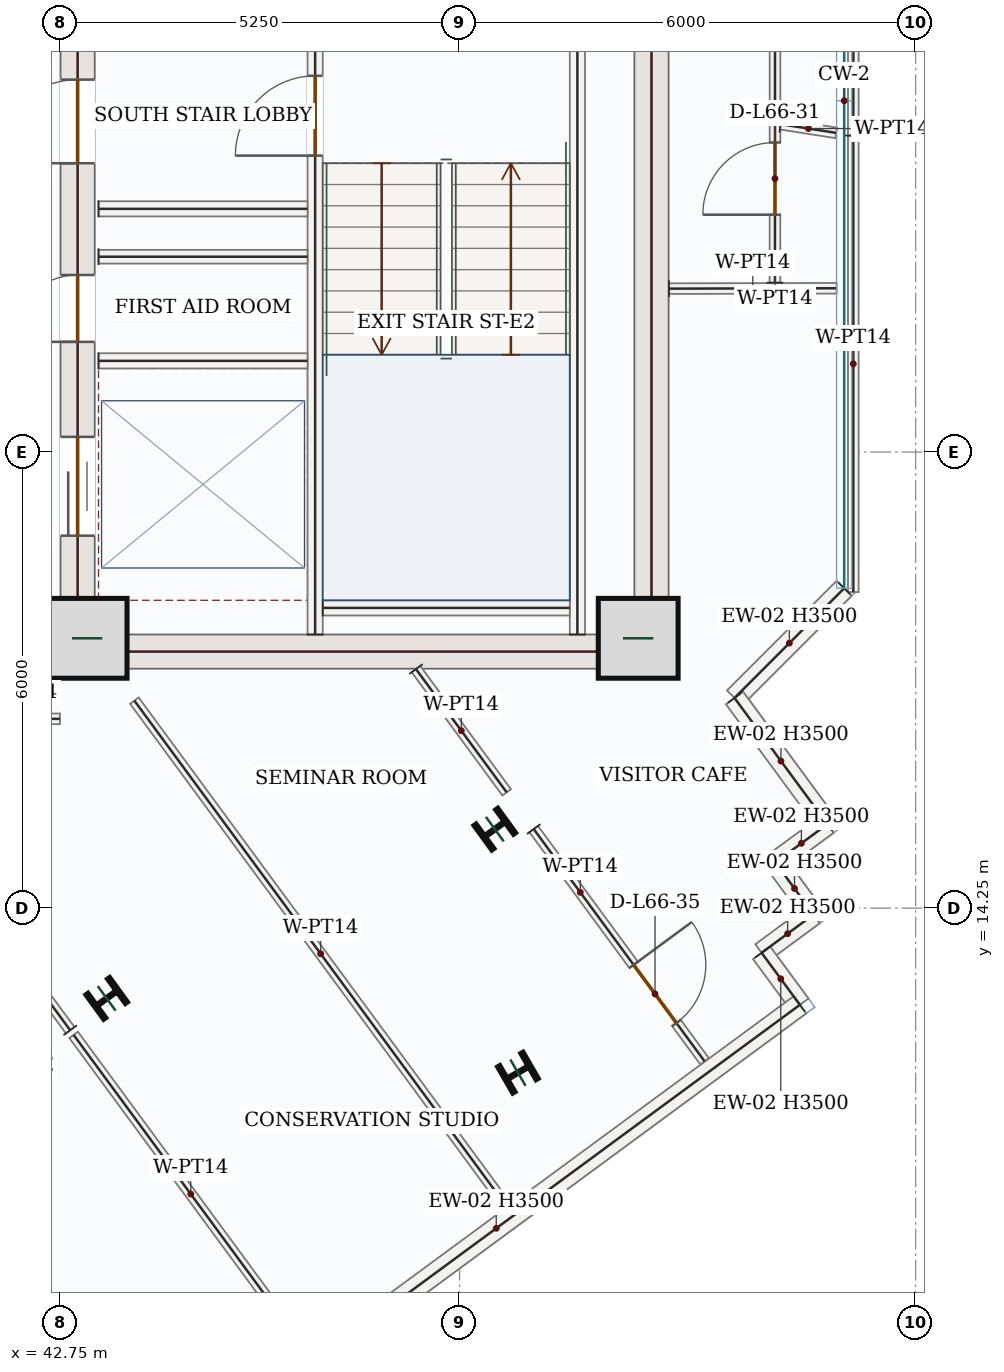
"""IFC4 building model, lengths in metres.
Left out: names, types, materials, properties, quantities, classifications, styles, units other than length and angle.
Written with IfcOpenShell. Run it as: python <this file> out.ifc"""

import sys

from ifc_helpers import new_model, si_unit, direction, frame, frame_2d, origin, origin_2d, place, context, subcontext, project, spatial, rectangle, i_section, extrude, source, transform, mapped, element, fill, save


model = new_model("IFC4")
c1 = context("Model", 3, precision=1e-05, world=origin(), true_north=direction((0.0, 1.0)))
c2 = subcontext(c1, "Body", "Model", "MODEL_VIEW")
j1 = project(units=[si_unit("LENGTHUNIT", "METRE"), si_unit("PLANEANGLEUNIT", "RADIAN")], contexts=[c1])
p1 = place(None, origin())
s1 = spatial("IfcSite", under=j1, at=p1, CompositionType="ELEMENT")
p2 = place(p1, origin())
s2 = spatial("IfcBuilding", under=s1, at=p2, CompositionType="ELEMENT")
p3 = place(p2, frame((0.0, 0.0, 276.6)))
s3 = spatial("IfcBuildingStorey", under=s2, at=p3, CompositionType="ELEMENT", Elevation=276.6)
p4 = place(p3, frame((42.975, 17.4, 0.0), z_axis=(0.0, 0.0, 1.0), x_axis=(0.0, 1.0, 0.0)))
e1 = element("IfcWall", 1, at=p4, inside=s3, PredefinedType="SHEAR", context=c2, shape_type="SweptSolid", body=[
    extrude(rectangle(XDim=8.55, YDim=0.45, at=frame_2d((4.275, 0.0))), origin(), (0.0, 0.0, 1.0), 3.5),
])
p5 = place(p4, frame((6.65, 0.0, 0.0)))
e2 = element("IfcOpeningElement", 2, at=p5, cuts=e1, PredefinedType="OPENING", context=c2, shape_type="SweptSolid", body=[
    extrude(rectangle(XDim=1.1, YDim=2.2, at=frame_2d((0.55, 1.1))), frame((0.0, 0.235, 0.0), z_axis=(0.0, -1.0, 0.0), x_axis=(1.0, 0.0, 0.0)), (0.0, 0.0, 1.0), 0.47),
])
p6 = place(p4, frame((1.75, 0.0, 0.0)))
e3 = element("IfcOpeningElement", 3, at=p6, cuts=e1, PredefinedType="OPENING", context=c2, shape_type="SweptSolid", body=[
    extrude(rectangle(XDim=1.3, YDim=2.2, at=frame_2d((0.65, 1.1))), frame((0.0, 0.235, 0.0), z_axis=(0.0, -1.0, 0.0), x_axis=(1.0, 0.0, 0.0)), (0.0, 0.0, 1.0), 0.47),
])
p7 = place(p4, frame((4.3, 0.0, 0.0)))
e4 = element("IfcOpeningElement", 4, at=p7, cuts=e1, PredefinedType="OPENING", context=c2, shape_type="SweptSolid", body=[
    extrude(rectangle(XDim=0.88, YDim=2.1, at=frame_2d((0.44, 1.05))), frame((0.0, 0.235, 0.0), z_axis=(0.0, -1.0, 0.0), x_axis=(1.0, 0.0, 0.0)), (0.0, 0.0, 1.0), 0.47),
])
m1 = source(origin(), c2, "Body", "SweptSolid", [
    extrude(rectangle(XDim=8.55, YDim=0.45, at=frame_2d((4.275, 0.0))), origin(), (0.0, 0.0, 1.0), 3.5),
])
p8 = place(p3, frame((50.525, 17.4, 0.0), z_axis=(0.0, 0.0, 1.0), x_axis=(0.0, 1.0, 0.0)))
e5 = element("IfcWall", 5, at=p8, inside=s3, PredefinedType="SHEAR", context=c2, shape_type="MappedRepresentation", body=[
    mapped(m1, transform((0.0, 0.0, 0.0), x_axis=(1.0, 0.0, 0.0), y_axis=(0.0, 1.0, 0.0), z_axis=(0.0, 0.0, 1.0), scale=1.0)),
])
m2 = source(origin(), c2, "Body", "SweptSolid", [
    extrude(rectangle(XDim=7.1, YDim=0.45, at=frame_2d((3.55, 0.0))), origin(), (0.0, 0.0, 1.0), 3.5),
])
p9 = place(p3, frame((43.2, 17.625, 0.0), z_axis=(0.0, 0.0, 1.0), x_axis=(1.0, 0.0, 0.0)))
e6 = element("IfcWall", 6, at=p9, inside=s3, PredefinedType="SHEAR", context=c2, shape_type="MappedRepresentation", body=[
    mapped(m2, transform((0.0, 0.0, 0.0), x_axis=(1.0, 0.0, 0.0), y_axis=(0.0, 1.0, 0.0), z_axis=(0.0, 0.0, 1.0), scale=1.0)),
])
m3 = source(origin(), c2, "Body", "SweptSolid", [
    extrude(rectangle(XDim=1.05, YDim=1.05, at=origin_2d()), origin(), (0.0, 0.0, 1.0), 3.75),
])
for number, where, z_axis, x_axis in (
    (7, (43.1, 17.8, 0.0), (0.0, 0.0, 1.0), (1.0, 0.0, 0.0)),
    (8, (50.35, 17.8, 0.0), (0.0, 0.0, 1.0), (1.0, 0.0, 0.0)),
):
    element("IfcColumn", number, at=place(p3, frame(where, z_axis=z_axis, x_axis=x_axis)), inside=s3, PredefinedType="COLUMN", context=c2, shape_type="MappedRepresentation", body=[
        mapped(m3, transform((0.0, 0.0, 0.0), x_axis=(1.0, 0.0, 0.0), y_axis=(0.0, 1.0, 0.0), z_axis=(0.0, 0.0, 1.0), scale=1.0)),
    ])
m4 = source(origin(), c2, "Body", "SweptSolid", [
    extrude(i_section(OverallWidth=0.399, OverallDepth=0.386, WebThickness=0.021, FlangeThickness=0.033, FilletRadius=0.018, at=origin_2d()), origin(), (0.0, 0.0, 1.0), 3.75),
])
for number, where, z_axis, x_axis in (
    (9, (43.357, 13.063, 0.0), (0.0, 0.0, 1.0), (-0.588, 0.809, 0.0)),
    (10, (48.464, 15.289, 0.0), (0.0, 0.0, 1.0), (-0.588, 0.809, 0.0)),
    (11, (48.768, 12.086, 0.0), (0.0, 0.0, 1.0), (-0.5, 0.866, 0.0)),
):
    element("IfcColumn", number, at=place(p3, frame(where, z_axis=z_axis, x_axis=x_axis)), inside=s3, PredefinedType="COLUMN", context=c2, shape_type="MappedRepresentation", body=[
        mapped(m4, transform((0.0, 0.0, 0.0), x_axis=(1.0, 0.0, 0.0), y_axis=(0.0, 1.0, 0.0), z_axis=(0.0, 0.0, 1.0), scale=1.0)),
    ])
m5 = source(origin(), c2, "Body", "SweptSolid", [
    extrude(rectangle(XDim=2.041, YDim=0.28, at=frame_2d((1.02, 0.0))), origin(), (0.0, 0.0, 1.0), 3.5),
])
p10 = place(p3, frame((53.06, 18.458, 0.0), z_axis=(0.0, 0.0, 1.0), x_axis=(-0.707106781187, -0.707106781187, 0.0)))
e12 = element("IfcWall", 12, at=p10, inside=s3, PredefinedType="SOLIDWALL", context=c2, shape_type="MappedRepresentation", body=[
    mapped(m5, transform((0.0, 0.0, 0.0), x_axis=(1.0, 0.0, 0.0), y_axis=(0.0, 1.0, 0.0), z_axis=(0.0, 0.0, 1.0), scale=1.0)),
])
m6 = source(origin(), c2, "Body", "SweptSolid", [
    extrude(rectangle(XDim=2.062, YDim=0.28, at=frame_2d((1.031, 0.0))), origin(), (0.0, 0.0, 1.0), 3.5),
])
p11 = place(p3, frame((51.617, 17.015, 0.0), z_axis=(0.0, 0.0, 1.0), x_axis=(0.592718215209, -0.80540990642, 0.0)))
e13 = element("IfcWall", 13, at=p11, inside=s3, PredefinedType="SOLIDWALL", context=c2, shape_type="MappedRepresentation", body=[
    mapped(m6, transform((0.0, 0.0, 0.0), x_axis=(1.0, 0.0, 0.0), y_axis=(0.0, 1.0, 0.0), z_axis=(0.0, 0.0, 1.0), scale=1.0)),
])
m7 = source(origin(), c2, "Body", "SweptSolid", [
    extrude(rectangle(XDim=0.85, YDim=0.28, at=frame_2d((0.425, 0.0))), origin(), (0.0, 0.0, 1.0), 3.5),
])
p12 = place(p3, frame((52.839, 15.355, 0.0), z_axis=(0.0, 0.0, 1.0), x_axis=(-0.80534450163, -0.592807079659, 0.0)))
e14 = element("IfcWall", 14, at=p12, inside=s3, PredefinedType="SOLIDWALL", context=c2, shape_type="MappedRepresentation", body=[
    mapped(m7, transform((0.0, 0.0, 0.0), x_axis=(1.0, 0.0, 0.0), y_axis=(0.0, 1.0, 0.0), z_axis=(0.0, 0.0, 1.0), scale=1.0)),
])
m8 = source(origin(), c2, "Body", "SweptSolid", [
    extrude(rectangle(XDim=0.85, YDim=0.28, at=frame_2d((0.425, 0.0))), origin(), (0.0, 0.0, 1.0), 3.5),
])
for number, where, z_axis, x_axis in (
    (15, (52.155, 14.851, 0.0), (0.0, 0.0, 1.0), (0.593, -0.805, 0.0)),
    (16, (52.658, 14.166, 0.0), (0.0, 0.0, 1.0), (-0.805, -0.593, 0.0)),
):
    element("IfcWall", number, at=place(p3, frame(where, z_axis=z_axis, x_axis=x_axis)), inside=s3, PredefinedType="SOLIDWALL", context=c2, shape_type="MappedRepresentation", body=[
        mapped(m8, transform((0.0, 0.0, 0.0), x_axis=(1.0, 0.0, 0.0), y_axis=(0.0, 1.0, 0.0), z_axis=(0.0, 0.0, 1.0), scale=1.0)),
    ])
m9 = source(origin(), c2, "Body", "SweptSolid", [
    extrude(rectangle(XDim=0.85, YDim=0.28, at=frame_2d((0.425, 0.0))), origin(), (0.0, 0.0, 1.0), 3.5),
])
p13 = place(p3, frame((51.974, 13.663, 0.0), z_axis=(0.0, 0.0, 1.0), x_axis=(0.592669983425, -0.805445398986, 0.0)))
e17 = element("IfcWall", 17, at=p13, inside=s3, PredefinedType="SOLIDWALL", context=c2, shape_type="MappedRepresentation", body=[
    mapped(m9, transform((0.0, 0.0, 0.0), x_axis=(1.0, 0.0, 0.0), y_axis=(0.0, 1.0, 0.0), z_axis=(0.0, 0.0, 1.0), scale=1.0)),
])
m10 = source(origin(), c2, "Body", "SweptSolid", [
    extrude(rectangle(XDim=9.92, YDim=0.28, at=frame_2d((4.96, 0.0))), origin(), (0.0, 0.0, 1.0), 3.5),
])
p14 = place(p3, frame((52.478, 12.978, 0.0), z_axis=(0.0, 0.0, 1.0), x_axis=(-0.805418797839, -0.592706132994, 0.0)))
e18 = element("IfcWall", 18, at=p14, inside=s3, PredefinedType="SOLIDWALL", context=c2, shape_type="MappedRepresentation", body=[
    mapped(m10, transform((0.0, 0.0, 0.0), x_axis=(1.0, 0.0, 0.0), y_axis=(0.0, 1.0, 0.0), z_axis=(0.0, 0.0, 1.0), scale=1.0)),
])
m11 = source(origin(), c2, "Body", "SweptSolid", [
    extrude(rectangle(XDim=7.87, YDim=0.2, at=frame_2d((3.935, 0.0))), origin(), (0.0, 0.0, 1.0), 3.5),
])
p15 = place(p3, frame((49.55, 17.85, 0.0), z_axis=(0.0, 0.0, 1.0), x_axis=(0.0, 1.0, 0.0)))
e19 = element("IfcWall", 19, at=p15, inside=s3, PredefinedType="SOLIDWALL", context=c2, shape_type="MappedRepresentation", body=[
    mapped(m11, transform((0.0, 0.0, 0.0), x_axis=(1.0, 0.0, 0.0), y_axis=(0.0, 1.0, 0.0), z_axis=(0.0, 0.0, 1.0), scale=1.0)),
])
p16 = place(p3, frame((46.1, 17.85, 0.0), z_axis=(0.0, 0.0, 1.0), x_axis=(0.0, 1.0, 0.0)))
e20 = element("IfcWall", 20, at=p16, inside=s3, PredefinedType="SOLIDWALL", context=c2, shape_type="SweptSolid", body=[
    extrude(rectangle(XDim=8.0, YDim=0.2, at=frame_2d((4.0, 0.0))), origin(), (0.0, 0.0, 1.0), 3.5),
])
p17 = place(p16, frame((6.3, 0.0, 0.0)))
e21 = element("IfcOpeningElement", 21, at=p17, cuts=e20, PredefinedType="OPENING", context=c2, shape_type="SweptSolid", body=[
    extrude(rectangle(XDim=1.05, YDim=2.15, at=frame_2d((0.525, 1.075))), frame((0.0, 0.11, 0.0), z_axis=(0.0, -1.0, 0.0), x_axis=(1.0, 0.0, 0.0)), (0.0, 0.0, 1.0), 0.22),
])
m12 = source(origin(), c2, "Body", "SweptSolid", [
    extrude(rectangle(XDim=3.25, YDim=0.2, at=frame_2d((1.625, 0.0))), origin(), (0.0, 0.0, 1.0), 3.5),
])
p18 = place(p3, frame((46.2, 18.2, 0.0), z_axis=(0.0, 0.0, 1.0), x_axis=(1.0, 0.0, 0.0)))
e22 = element("IfcWall", 22, at=p18, inside=s3, PredefinedType="SOLIDWALL", context=c2, shape_type="MappedRepresentation", body=[
    mapped(m12, transform((0.0, 0.0, 0.0), x_axis=(1.0, 0.0, 0.0), y_axis=(0.0, 1.0, 0.0), z_axis=(0.0, 0.0, 1.0), scale=1.0)),
])
m13 = source(origin(), c2, "Body", "SweptSolid", [
    extrude(rectangle(XDim=2.75, YDim=0.2, at=frame_2d((1.375, 0.0))), origin(), (0.0, 0.0, 1.0), 3.5),
])
for number, where, z_axis, x_axis in (
    (23, (43.25, 23.45, 0.0), (0.0, 0.0, 1.0), (1.0, 0.0, 0.0)),
    (24, (43.25, 21.45, 0.0), (0.0, 0.0, 1.0), (1.0, 0.0, 0.0)),
):
    element("IfcWall", number, at=place(p3, frame(where, z_axis=z_axis, x_axis=x_axis)), inside=s3, PredefinedType="SOLIDWALL", context=c2, shape_type="MappedRepresentation", body=[
        mapped(m13, transform((0.0, 0.0, 0.0), x_axis=(1.0, 0.0, 0.0), y_axis=(0.0, 1.0, 0.0), z_axis=(0.0, 0.0, 1.0), scale=1.0)),
    ])
m14 = source(origin(), c2, "Body", "SweptSolid", [
    extrude(rectangle(XDim=2.75, YDim=0.18, at=frame_2d((1.375, 0.0))), origin(), (0.0, 0.0, 1.0), 3.5),
])
p19 = place(p3, frame((43.25, 22.82, 0.0), z_axis=(0.0, 0.0, 1.0), x_axis=(1.0, 0.0, 0.0)))
e25 = element("IfcWall", 25, at=p19, inside=s3, PredefinedType="PARTITIONING", context=c2, shape_type="MappedRepresentation", body=[
    mapped(m14, transform((0.0, 0.0, 0.0), x_axis=(1.0, 0.0, 0.0), y_axis=(0.0, 1.0, 0.0), z_axis=(0.0, 0.0, 1.0), scale=1.0)),
])
m15 = source(origin(), c2, "Body", "SweptSolid", [
    extrude(rectangle(XDim=8.268, YDim=0.14, at=frame_2d((4.134, 0.0))), origin(), (0.0, 0.0, 1.0), 3.5),
])
p20 = place(p3, frame((48.622, 10.321, 0.0), z_axis=(0.0, 0.0, 1.0), x_axis=(-0.592718477136, 0.805409713663, 0.0)))
e26 = element("IfcWall", 26, at=p20, inside=s3, PredefinedType="PARTITIONING", context=c2, shape_type="MappedRepresentation", body=[
    mapped(m15, transform((0.0, 0.0, 0.0), x_axis=(1.0, 0.0, 0.0), y_axis=(0.0, 1.0, 0.0), z_axis=(0.0, 0.0, 1.0), scale=1.0)),
])
m16 = source(origin(), c2, "Body", "SweptSolid", [
    extrude(rectangle(XDim=2.013, YDim=0.14, at=frame_2d((1.006, 0.0))), origin(), (0.0, 0.0, 1.0), 3.5),
])
p21 = place(p3, frame((47.427, 17.395, 0.0), z_axis=(0.0, 0.0, 1.0), x_axis=(0.592698341467, -0.80542453155, 0.0)))
e27 = element("IfcWall", 27, at=p21, inside=s3, PredefinedType="PARTITIONING", context=c2, shape_type="MappedRepresentation", body=[
    mapped(m16, transform((0.0, 0.0, 0.0), x_axis=(1.0, 0.0, 0.0), y_axis=(0.0, 1.0, 0.0), z_axis=(0.0, 0.0, 1.0), scale=1.0)),
])
p22 = place(p3, frame((48.975, 15.29, 0.0), z_axis=(0.0, 0.0, 1.0), x_axis=(0.592735674873, -0.805397057192, 0.0)))
e28 = element("IfcWall", 28, at=p22, inside=s3, PredefinedType="PARTITIONING", context=c2, shape_type="SweptSolid", body=[
    extrude(rectangle(XDim=3.793, YDim=0.14, at=frame_2d((1.896, 0.0))), origin(), (0.0, 0.0, 1.0), 3.5),
])
p23 = place(p22, frame((2.218, 0.0, 0.0)))
e29 = element("IfcOpeningElement", 29, at=p23, cuts=e28, PredefinedType="OPENING", context=c2, shape_type="SweptSolid", body=[
    extrude(rectangle(XDim=0.95, YDim=2.15, at=frame_2d((0.475, 1.075))), frame((0.0, 0.08, 0.0), z_axis=(0.0, -1.0, 0.0), x_axis=(1.0, 0.0, 0.0)), (0.0, 0.0, 1.0), 0.16),
])
m17 = source(origin(), c2, "Body", "SweptSolid", [
    extrude(rectangle(XDim=2.205, YDim=0.14, at=frame_2d((1.103, 0.0))), origin(), (0.0, 0.0, 1.0), 3.5),
])
p24 = place(p3, frame((50.755, 22.4, 0.0), z_axis=(0.0, 0.0, 1.0), x_axis=(0.999997297044, 0.002325060146, 0.0)))
e30 = element("IfcWall", 30, at=p24, inside=s3, PredefinedType="PARTITIONING", context=c2, shape_type="MappedRepresentation", body=[
    mapped(m17, transform((0.0, 0.0, 0.0), x_axis=(1.0, 0.0, 0.0), y_axis=(0.0, 1.0, 0.0), z_axis=(0.0, 0.0, 1.0), scale=1.0)),
])
p25 = place(p3, frame((52.149, 22.478, 0.0), z_axis=(0.0, 0.0, 1.0), x_axis=(0.000465766135, 0.999999891531, 0.0)))
e31 = element("IfcWall", 31, at=p25, inside=s3, PredefinedType="PARTITIONING", context=c2, shape_type="SweptSolid", body=[
    extrude(rectangle(XDim=2.097, YDim=0.14, at=frame_2d((1.048, 0.0))), origin(), (0.0, 0.0, 1.0), 3.5),
])
p26 = place(p25, frame((0.894, 0.0, 0.0)))
e32 = element("IfcOpeningElement", 32, at=p26, cuts=e31, PredefinedType="OPENING", context=c2, shape_type="SweptSolid", body=[
    extrude(rectangle(XDim=0.95, YDim=2.15, at=frame_2d((0.475, 1.075))), frame((0.0, 0.08, 0.0), z_axis=(0.0, -1.0, 0.0), x_axis=(1.0, 0.0, 0.0)), (0.0, 0.0, 1.0), 0.16),
])
m18 = source(origin(), c2, "Body", "SweptSolid", [
    extrude(rectangle(XDim=0.739, YDim=0.14, at=frame_2d((0.369, 0.0))), origin(), (0.0, 0.0, 1.0), 3.5),
])
p27 = place(p3, frame((52.225, 24.563, 0.0), z_axis=(0.0, 0.0, 1.0), x_axis=(0.988021482099, -0.154316398709, 0.0)))
e33 = element("IfcWall", 33, at=p27, inside=s3, PredefinedType="PARTITIONING", context=c2, shape_type="MappedRepresentation", body=[
    mapped(m18, transform((0.0, 0.0, 0.0), x_axis=(1.0, 0.0, 0.0), y_axis=(0.0, 1.0, 0.0), z_axis=(0.0, 0.0, 1.0), scale=1.0)),
])
m19 = source(origin(), c2, "Body", "SweptSolid", [
    extrude(rectangle(XDim=6.006, YDim=0.14, at=frame_2d((3.003, 0.0))), origin(), (0.0, 0.0, 1.0), 3.5),
])
p28 = place(p3, frame((53.18, 24.414, 0.0), z_axis=(0.0, 0.0, 1.0), x_axis=(0.0, -1.0, 0.0)))
e34 = element("IfcWall", 34, at=p28, inside=s3, PredefinedType="PARTITIONING", context=c2, shape_type="MappedRepresentation", body=[
    mapped(m19, transform((0.0, 0.0, 0.0), x_axis=(1.0, 0.0, 0.0), y_axis=(0.0, 1.0, 0.0), z_axis=(0.0, 0.0, 1.0), scale=1.0)),
])
m20 = source(origin(), c2, "Body", "SweptSolid", [
    extrude(rectangle(XDim=5.2, YDim=0.14, at=frame_2d((2.6, 0.0))), origin(), (0.0, 0.0, 1.0), 3.5),
])
p29 = place(p3, frame((46.005, 8.394, 0.0), z_axis=(0.0, 0.0, 1.0), x_axis=(-0.592704087561, 0.805420303065, 0.0)))
e35 = element("IfcWall", 35, at=p29, inside=s3, PredefinedType="PARTITIONING", context=c2, shape_type="MappedRepresentation", body=[
    mapped(m20, transform((0.0, 0.0, 0.0), x_axis=(1.0, 0.0, 0.0), y_axis=(0.0, 1.0, 0.0), z_axis=(0.0, 0.0, 1.0), scale=1.0)),
])
m21 = source(origin(), c2, "Body", "SweptSolid", [
    extrude(rectangle(XDim=5.086, YDim=0.14, at=frame_2d((2.543, 0.0))), origin(), (0.0, 0.0, 1.0), 3.5),
])
p30 = place(p3, frame((42.877, 12.644, 0.0), z_axis=(0.0, 0.0, 1.0), x_axis=(-0.592678177251, 0.805439369668, 0.0)))
e36 = element("IfcWall", 36, at=p30, inside=s3, PredefinedType="PARTITIONING", context=c2, shape_type="MappedRepresentation", body=[
    mapped(m21, transform((0.0, 0.0, 0.0), x_axis=(1.0, 0.0, 0.0), y_axis=(0.0, 1.0, 0.0), z_axis=(0.0, 0.0, 1.0), scale=1.0)),
])
p31 = place(p3, frame((39.956, 16.74, 0.0), z_axis=(0.0, 0.0, 1.0), x_axis=(0.999999996161, 8.7619381e-05, 0.0)))
e37 = element("IfcWall", 37, at=p31, inside=s3, PredefinedType="PARTITIONING", context=c2, shape_type="SweptSolid", body=[
    extrude(rectangle(XDim=2.786, YDim=0.14, at=frame_2d((1.393, 0.0))), origin(), (0.0, 0.0, 1.0), 3.5),
])
p32 = place(p31, frame((0.643, 0.0, 0.0)))
e38 = element("IfcOpeningElement", 38, at=p32, cuts=e37, PredefinedType="OPENING", context=c2, shape_type="SweptSolid", body=[
    extrude(rectangle(XDim=0.95, YDim=2.15, at=frame_2d((0.475, 1.075))), frame((0.0, 0.08, 0.0), z_axis=(0.0, -1.0, 0.0), x_axis=(1.0, 0.0, 0.0)), (0.0, 0.0, 1.0), 0.16),
])
m22 = source(origin(), c2, "Body", "SweptSolid", [
    extrude(rectangle(XDim=6.782, YDim=0.14, at=frame_2d((3.391, 0.0))), origin(), (0.0, 0.0, 1.0), 3.5),
])
p33 = place(p3, frame((53.183, 31.196, 0.0), z_axis=(0.0, 0.0, 1.0), x_axis=(-0.000467979358, -0.999999890498, 0.0)))
e39 = element("IfcWall", 39, at=p33, inside=s3, PredefinedType="PARTITIONING", context=c2, shape_type="MappedRepresentation", body=[
    mapped(m22, transform((0.0, 0.0, 0.0), x_axis=(1.0, 0.0, 0.0), y_axis=(0.0, 1.0, 0.0), z_axis=(0.0, 0.0, 1.0), scale=1.0)),
])
p34 = place(p3, frame((52.15, 24.575, 0.0), z_axis=(0.0, 0.0, 1.0), x_axis=(-0.000139028882, 0.999999990335, 0.0)))
e40 = element("IfcWall", 40, at=p34, inside=s3, PredefinedType="PARTITIONING", context=c2, shape_type="SweptSolid", body=[
    extrude(rectangle(XDim=7.024, YDim=0.14, at=frame_2d((3.512, 0.0))), origin(), (0.0, 0.0, 1.0), 3.5),
])
p35 = place(p34, frame((1.336, 0.0, 0.0)))
e41 = element("IfcOpeningElement", 41, at=p35, cuts=e40, PredefinedType="OPENING", context=c2, shape_type="SweptSolid", body=[
    extrude(rectangle(XDim=0.95, YDim=2.15, at=frame_2d((0.475, 1.075))), frame((0.0, 0.08, 0.0), z_axis=(0.0, -1.0, 0.0), x_axis=(1.0, 0.0, 0.0)), (0.0, 0.0, 1.0), 0.16),
])
m23 = source(origin(), c2, "Body", "SweptSolid", [
    extrude(rectangle(XDim=1.05, YDim=2.15, at=frame_2d((0.525, 1.075))), frame((0.0, 0.025, 0.0), z_axis=(0.0, -1.0, 0.0), x_axis=(1.0, 0.0, 0.0)), (0.0, 0.0, 1.0), 0.05),
])
p36 = place(p17, origin())
e42 = element("IfcDoor", 42, at=p36, inside=s3, OperationType="SINGLE_SWING_LEFT", PredefinedType="DOOR", context=c2, shape_type="MappedRepresentation", body=[
    mapped(m23, transform((0.0, 0.0, 0.0), x_axis=(1.0, 0.0, 0.0), y_axis=(0.0, 1.0, 0.0), z_axis=(0.0, 0.0, 1.0), scale=1.0)),
])
fill(e21, e42)
m24 = source(origin(), c2, "Body", "SweptSolid", [
    extrude(rectangle(XDim=1.1, YDim=2.2, at=frame_2d((0.55, 1.1))), frame((0.0, 0.025, 0.0), z_axis=(0.0, -1.0, 0.0), x_axis=(1.0, 0.0, 0.0)), (0.0, 0.0, 1.0), 0.05),
])
p37 = place(p5, origin())
e43 = element("IfcDoor", 43, at=p37, inside=s3, OperationType="SINGLE_SWING_LEFT", PredefinedType="DOOR", context=c2, shape_type="MappedRepresentation", body=[
    mapped(m24, transform((0.0, 0.0, 0.0), x_axis=(1.0, 0.0, 0.0), y_axis=(0.0, 1.0, 0.0), z_axis=(0.0, 0.0, 1.0), scale=1.0)),
])
fill(e2, e43)
m25 = source(origin(), c2, "Body", "SweptSolid", [
    extrude(rectangle(XDim=1.3, YDim=2.2, at=frame_2d((0.65, 1.1))), frame((0.0, 0.025, 0.0), z_axis=(0.0, -1.0, 0.0), x_axis=(1.0, 0.0, 0.0)), (0.0, 0.0, 1.0), 0.05),
])
p38 = place(p6, origin())
e44 = element("IfcDoor", 44, at=p38, inside=s3, OperationType="DOUBLE_DOOR_SLIDING", PredefinedType="DOOR", context=c2, shape_type="MappedRepresentation", body=[
    mapped(m25, transform((0.0, 0.0, 0.0), x_axis=(1.0, 0.0, 0.0), y_axis=(0.0, 1.0, 0.0), z_axis=(0.0, 0.0, 1.0), scale=1.0)),
])
fill(e3, e44)
m26 = source(origin(), c2, "Body", "SweptSolid", [
    extrude(rectangle(XDim=0.88, YDim=2.1, at=frame_2d((0.44, 1.05))), frame((0.0, 0.025, 0.0), z_axis=(0.0, -1.0, 0.0), x_axis=(1.0, 0.0, 0.0)), (0.0, 0.0, 1.0), 0.05),
])
p39 = place(p7, origin())
e45 = element("IfcDoor", 45, at=p39, inside=s3, OperationType="SINGLE_SWING_LEFT", PredefinedType="DOOR", context=c2, shape_type="MappedRepresentation", body=[
    mapped(m26, transform((0.0, 0.0, 0.0), x_axis=(1.0, 0.0, 0.0), y_axis=(0.0, 1.0, 0.0), z_axis=(0.0, 0.0, 1.0), scale=1.0)),
])
fill(e4, e45)
m27 = source(origin(), c2, "Body", "SweptSolid", [
    extrude(rectangle(XDim=0.95, YDim=2.15, at=frame_2d((0.475, 1.075))), frame((0.0, 0.025, 0.0), z_axis=(0.0, -1.0, 0.0), x_axis=(1.0, 0.0, 0.0)), (0.0, 0.0, 1.0), 0.05),
])
p40 = place(p26, origin())
e46 = element("IfcDoor", 46, at=p40, inside=s3, OperationType="SINGLE_SWING_LEFT", PredefinedType="DOOR", context=c2, shape_type="MappedRepresentation", body=[
    mapped(m27, transform((0.0, 0.0, 0.0), x_axis=(1.0, 0.0, 0.0), y_axis=(0.0, 1.0, 0.0), z_axis=(0.0, 0.0, 1.0), scale=1.0)),
])
fill(e32, e46)
p41 = place(p23, origin())
e47 = element("IfcDoor", 47, at=p41, inside=s3, OperationType="SINGLE_SWING_LEFT", PredefinedType="DOOR", context=c2, shape_type="MappedRepresentation", body=[
    mapped(m27, transform((0.0, 0.0, 0.0), x_axis=(1.0, 0.0, 0.0), y_axis=(0.0, 1.0, 0.0), z_axis=(0.0, 0.0, 1.0), scale=1.0)),
])
fill(e29, e47)
save(model, sys.argv[1])
